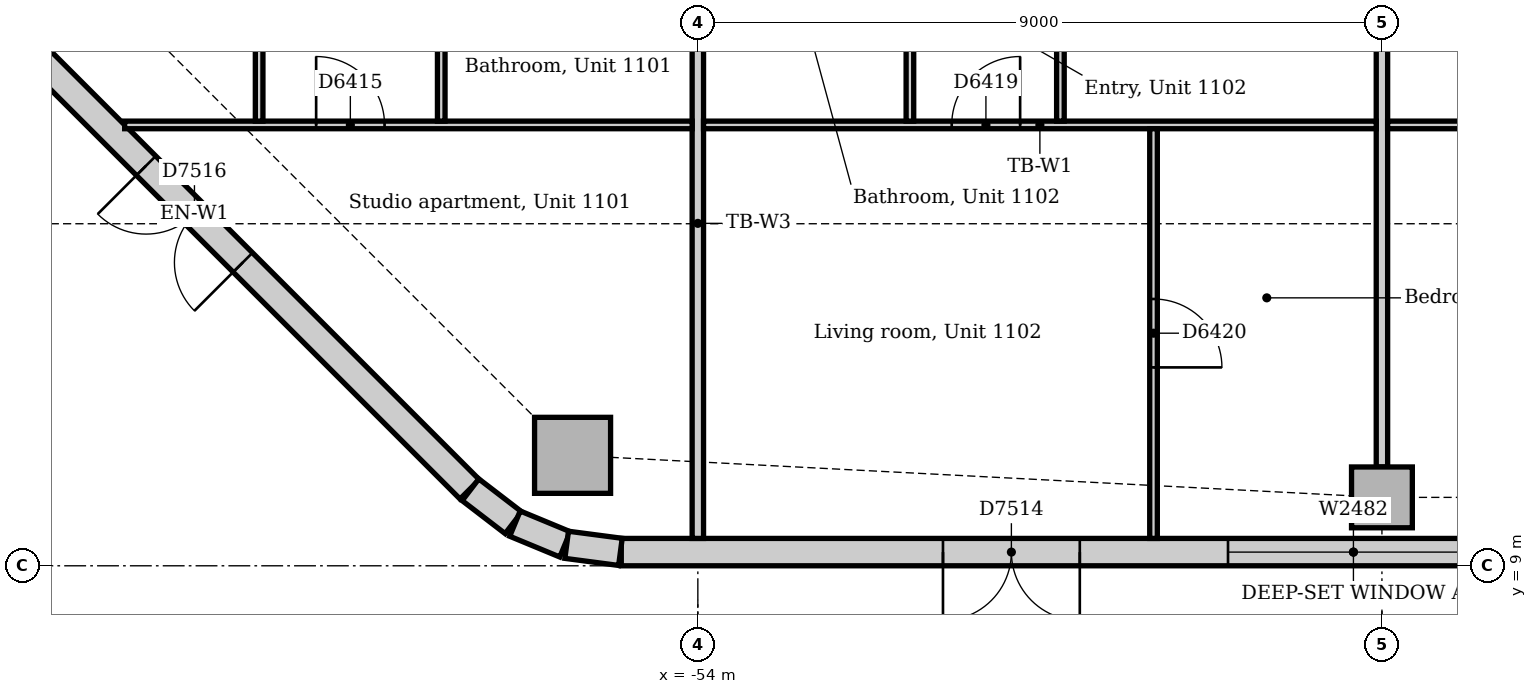
"""IFC4 building model, lengths in metres.
Left out: names, types, materials, properties, quantities, classifications, styles, units other than length and angle.
Written with IfcOpenShell. Run it as: python <this file> out.ifc"""

import sys

from ifc_helpers import new_model, si_unit, direction, frame, frame_2d, origin, origin_2d, place, context, subcontext, project, spatial, rectangle, extrude, element, fill, save


model = new_model("IFC4")
c1 = context("Model", 3, precision=1e-05, world=origin(), true_north=direction((0.0, 1.0)))
c2 = subcontext(c1, "Body", "Model", "MODEL_VIEW")
j1 = project(units=[si_unit("LENGTHUNIT", "METRE"), si_unit("PLANEANGLEUNIT", "RADIAN")], contexts=[c1])
p1 = place(None, origin())
s1 = spatial("IfcSite", under=j1, at=p1, CompositionType="ELEMENT")
p2 = place(p1, origin())
s2 = spatial("IfcBuilding", under=s1, at=p2, CompositionType="ELEMENT")
p3 = place(p2, frame((0.0, 0.0, 51.0)))
s3 = spatial("IfcBuildingStorey", under=s2, at=p3, CompositionType="ELEMENT", Elevation=51.0)
p4 = place(p3, frame((-55.648, 10.453, -0.15), z_axis=(0.0, 0.0, 1.0), x_axis=(1.0, 0.0, 0.0)))
e1 = element("IfcColumn", 1, at=p4, inside=s3, PredefinedType="COLUMN", context=c2, shape_type="SweptSolid", body=[
    extrude(rectangle(XDim=1.0, YDim=1.0, at=origin_2d()), origin(), (0.0, 0.0, 1.0), 4.0),
])
p5 = place(p3, frame((-45.0, 9.9, -0.15), z_axis=(0.0, 0.0, 1.0), x_axis=(1.0, 0.0, 0.0)))
e2 = element("IfcColumn", 2, at=p5, inside=s3, PredefinedType="COLUMN", context=c2, shape_type="SweptSolid", body=[
    extrude(rectangle(XDim=0.8, YDim=0.8, at=origin_2d()), origin(), (0.0, 0.0, 1.0), 4.0),
])
p6 = place(p3, frame((-55.007, 9.18, 0.0), z_axis=(0.0, 0.0, 1.0), x_axis=(1.0, 0.0, 0.0)))
e3 = element("IfcWall", 3, at=p6, inside=s3, PredefinedType="STANDARD", context=c2, shape_type="SweptSolid", body=[
    extrude(rectangle(XDim=23.765, YDim=0.36, at=frame_2d((11.882, 0.0))), origin(), (0.0, 0.0, 1.0), 3.85),
])
p7 = place(p6, frame((4.232, 0.0, 0.0)))
e4 = element("IfcOpeningElement", 4, at=p7, cuts=e3, PredefinedType="OPENING", context=c2, shape_type="SweptSolid", body=[
    extrude(rectangle(XDim=1.8, YDim=2.4, at=frame_2d((0.9, 1.2))), frame((0.0, 0.19, 0.0), z_axis=(0.0, -1.0, 0.0), x_axis=(1.0, 0.0, 0.0)), (0.0, 0.0, 1.0), 0.38),
])
p8 = place(p6, frame((7.982, 0.0, 0.9)))
e5 = element("IfcOpeningElement", 5, at=p8, cuts=e3, PredefinedType="OPENING", context=c2, shape_type="SweptSolid", body=[
    extrude(rectangle(XDim=3.3, YDim=1.6, at=frame_2d((1.65, 0.8))), frame((0.0, 0.19, 0.0), z_axis=(0.0, -1.0, 0.0), x_axis=(1.0, 0.0, 0.0)), (0.0, 0.0, 1.0), 0.38),
])
p9 = place(p6, frame((12.482, 0.0, 0.9)))
e6 = element("IfcOpeningElement", 6, at=p9, cuts=e3, PredefinedType="OPENING", context=c2, shape_type="SweptSolid", body=[
    extrude(rectangle(XDim=3.3, YDim=1.6, at=frame_2d((1.65, 0.8))), frame((0.0, 0.19, 0.0), z_axis=(0.0, -1.0, 0.0), x_axis=(1.0, 0.0, 0.0)), (0.0, 0.0, 1.0), 0.38),
])
p10 = place(p6, frame((16.982, 0.0, 0.9)))
e7 = element("IfcOpeningElement", 7, at=p10, cuts=e3, PredefinedType="OPENING", context=c2, shape_type="SweptSolid", body=[
    extrude(rectangle(XDim=3.3, YDim=1.6, at=frame_2d((1.65, 0.8))), frame((0.0, 0.19, 0.0), z_axis=(0.0, -1.0, 0.0), x_axis=(1.0, 0.0, 0.0)), (0.0, 0.0, 1.0), 0.38),
])
p11 = place(p6, frame((21.424, 0.0, 0.9)))
e8 = element("IfcOpeningElement", 8, at=p11, cuts=e3, PredefinedType="OPENING", context=c2, shape_type="SweptSolid", body=[
    extrude(rectangle(XDim=1.8, YDim=1.6, at=frame_2d((0.9, 0.8))), frame((0.0, 0.19, 0.0), z_axis=(0.0, -1.0, 0.0), x_axis=(1.0, 0.0, 0.0)), (0.0, 0.0, 1.0), 0.38),
])
p12 = place(p3, frame((-64.244, 17.249, 0.0), z_axis=(0.0, 0.0, 1.0), x_axis=(0.707106781187, -0.707106781187, 0.0)))
e9 = element("IfcWall", 9, at=p12, inside=s3, PredefinedType="STANDARD", context=c2, shape_type="SweptSolid", body=[
    extrude(rectangle(XDim=10.243, YDim=0.36, at=frame_2d((5.121, 0.0))), origin(), (0.0, 0.0, 1.0), 3.85),
])
p13 = place(p12, frame((4.221, 0.0, 0.0)))
e10 = element("IfcOpeningElement", 10, at=p13, cuts=e9, PredefinedType="OPENING", context=c2, shape_type="SweptSolid", body=[
    extrude(rectangle(XDim=1.8, YDim=2.4, at=frame_2d((0.9, 1.2))), frame((0.0, 0.19, 0.0), z_axis=(0.0, -1.0, 0.0), x_axis=(1.0, 0.0, 0.0)), (0.0, 0.0, 1.0), 0.38),
])
p14 = place(p3, frame((-56.991, 10.0, 0.0), z_axis=(0.0, 0.0, 1.0), x_axis=(0.793321924995, -0.608802368033, 0.0)))
e11 = element("IfcWall", 11, at=p14, inside=s3, PredefinedType="STANDARD", context=c2, shape_type="SweptSolid", body=[
    extrude(rectangle(XDim=0.713, YDim=0.36, at=frame_2d((0.357, 0.0))), origin(), (0.0, 0.0, 1.0), 3.85),
])
for number, where, z_axis, x_axis in (
    (12, (-56.406, 9.555, 0.0), (0.0, 0.0, 1.0), (0.924, -0.383, 0.0)),
    (13, (-55.726, 9.276, 0.0), (0.0, 0.0, 1.0), (0.991, -0.131, 0.0)),
):
    element("IfcWall", number, at=place(p3, frame(where, z_axis=z_axis, x_axis=x_axis)), inside=s3, PredefinedType="STANDARD", context=c2, shape_type="SweptSolid", body=[
        extrude(rectangle(XDim=0.713, YDim=0.36, at=frame_2d((0.356, 0.0))), origin(), (0.0, 0.0, 1.0), 3.85),
    ])
p15 = place(p3, frame((-54.0, 9.36, 0.0), z_axis=(0.0, 0.0, 1.0), x_axis=(0.0, 1.0, 0.0)))
e14 = element("IfcWall", 14, at=p15, inside=s3, PredefinedType="PARTITIONING", context=c2, shape_type="SweptSolid", body=[
    extrude(rectangle(XDim=8.29, YDim=0.15, at=frame_2d((4.145, 0.0))), origin(), (0.0, 0.0, 1.0), 3.256),
])
p16 = place(p3, frame((-45.0, 10.3, 0.0), z_axis=(0.0, 0.0, 1.0), x_axis=(0.0, 1.0, 0.0)))
e15 = element("IfcWall", 15, at=p16, inside=s3, PredefinedType="PARTITIONING", context=c2, shape_type="SweptSolid", body=[
    extrude(rectangle(XDim=7.35, YDim=0.15, at=frame_2d((3.675, 0.0))), origin(), (0.0, 0.0, 1.0), 3.256),
])
p17 = place(p3, frame((-44.925, 14.8, 0.0), z_axis=(0.0, 0.0, 1.0), x_axis=(1.0, 0.0, 0.0)))
e16 = element("IfcWall", 16, at=p17, inside=s3, PredefinedType="PARTITIONING", context=c2, shape_type="SweptSolid", body=[
    extrude(rectangle(XDim=8.85, YDim=0.1, at=frame_2d((4.425, 0.0))), origin(), (0.0, 0.0, 1.0), 3.85),
])
p18 = place(p17, frame((3.265, 0.0, 0.0)))
e17 = element("IfcOpeningElement", 17, at=p18, cuts=e16, PredefinedType="OPENING", context=c2, shape_type="SweptSolid", body=[
    extrude(rectangle(XDim=0.9, YDim=2.1, at=frame_2d((0.45, 1.05))), frame((0.0, 0.06, 0.0), z_axis=(0.0, -1.0, 0.0), x_axis=(1.0, 0.0, 0.0)), (0.0, 0.0, 1.0), 0.12),
])
p19 = place(p3, frame((-53.925, 14.8, 0.0), z_axis=(0.0, 0.0, 1.0), x_axis=(1.0, 0.0, 0.0)))
e18 = element("IfcWall", 18, at=p19, inside=s3, PredefinedType="PARTITIONING", context=c2, shape_type="SweptSolid", body=[
    extrude(rectangle(XDim=8.85, YDim=0.1, at=frame_2d((4.425, 0.0))), origin(), (0.0, 0.0, 1.0), 3.85),
])
p20 = place(p19, frame((3.265, 0.0, 0.0)))
e19 = element("IfcOpeningElement", 19, at=p20, cuts=e18, PredefinedType="OPENING", context=c2, shape_type="SweptSolid", body=[
    extrude(rectangle(XDim=0.9, YDim=2.1, at=frame_2d((0.45, 1.05))), frame((0.0, 0.06, 0.0), z_axis=(0.0, -1.0, 0.0), x_axis=(1.0, 0.0, 0.0)), (0.0, 0.0, 1.0), 0.12),
])
p21 = place(p3, frame((-61.541, 14.8, 0.0), z_axis=(0.0, 0.0, 1.0), x_axis=(1.0, 0.0, 0.0)))
e20 = element("IfcWall", 20, at=p21, inside=s3, PredefinedType="PARTITIONING", context=c2, shape_type="SweptSolid", body=[
    extrude(rectangle(XDim=7.466, YDim=0.1, at=frame_2d((3.733, 0.0))), origin(), (0.0, 0.0, 1.0), 3.85),
])
p22 = place(p21, frame((2.519, 0.0, 0.0)))
e21 = element("IfcOpeningElement", 21, at=p22, cuts=e20, PredefinedType="OPENING", context=c2, shape_type="SweptSolid", body=[
    extrude(rectangle(XDim=0.9, YDim=2.1, at=frame_2d((0.45, 1.05))), frame((0.0, 0.06, 0.0), z_axis=(0.0, -1.0, 0.0), x_axis=(1.0, 0.0, 0.0)), (0.0, 0.0, 1.0), 0.12),
])
p23 = place(p3, frame((-48.005, 9.36, 0.0), z_axis=(0.0, 0.0, 1.0), x_axis=(0.0, 1.0, 0.0)))
e22 = element("IfcWall", 22, at=p23, inside=s3, PredefinedType="PARTITIONING", context=c2, shape_type="SweptSolid", body=[
    extrude(rectangle(XDim=5.39, YDim=0.1, at=frame_2d((2.695, 0.0))), origin(), (0.0, 0.0, 1.0), 3.85),
])
p24 = place(p23, frame((2.25, 0.0, 0.0)))
e23 = element("IfcOpeningElement", 23, at=p24, cuts=e22, PredefinedType="OPENING", context=c2, shape_type="SweptSolid", body=[
    extrude(rectangle(XDim=0.9, YDim=2.1, at=frame_2d((0.45, 1.05))), frame((0.0, 0.06, 0.0), z_axis=(0.0, -1.0, 0.0), x_axis=(1.0, 0.0, 0.0)), (0.0, 0.0, 1.0), 0.12),
])
p25 = place(p3, frame((-59.772, 14.85, 0.0), z_axis=(0.0, 0.0, 1.0), x_axis=(0.0, 1.0, 0.0)))
e24 = element("IfcWall", 24, at=p25, inside=s3, PredefinedType="PARTITIONING", context=c2, shape_type="SweptSolid", body=[
    extrude(rectangle(XDim=3.075, YDim=0.1, at=frame_2d((1.538, 0.0))), origin(), (0.0, 0.0, 1.0), 3.85),
])
p26 = place(p25, frame((1.1, 0.0, 0.0)))
e25 = element("IfcOpeningElement", 25, at=p26, cuts=e24, PredefinedType="OPENING", context=c2, shape_type="SweptSolid", body=[
    extrude(rectangle(XDim=0.9, YDim=2.1, at=frame_2d((0.45, 1.05))), frame((0.0, 0.06, 0.0), z_axis=(0.0, -1.0, 0.0), x_axis=(1.0, 0.0, 0.0)), (0.0, 0.0, 1.0), 0.12),
])
p27 = place(p3, frame((-57.376, 14.85, 0.0), z_axis=(0.0, 0.0, 1.0), x_axis=(0.0, 1.0, 0.0)))
e26 = element("IfcWall", 26, at=p27, inside=s3, PredefinedType="PARTITIONING", context=c2, shape_type="SweptSolid", body=[
    extrude(rectangle(XDim=3.075, YDim=0.1, at=frame_2d((1.538, 0.0))), origin(), (0.0, 0.0, 1.0), 3.85),
])
p28 = place(p27, frame((1.1, 0.0, 0.0)))
e27 = element("IfcOpeningElement", 27, at=p28, cuts=e26, PredefinedType="OPENING", context=c2, shape_type="SweptSolid", body=[
    extrude(rectangle(XDim=0.9, YDim=2.1, at=frame_2d((0.45, 1.05))), frame((0.0, 0.06, 0.0), z_axis=(0.0, -1.0, 0.0), x_axis=(1.0, 0.0, 0.0)), (0.0, 0.0, 1.0), 0.12),
])
p29 = place(p3, frame((-51.21, 14.85, 0.0), z_axis=(0.0, 0.0, 1.0), x_axis=(0.0, 1.0, 0.0)))
e28 = element("IfcWall", 28, at=p29, inside=s3, PredefinedType="PARTITIONING", context=c2, shape_type="SweptSolid", body=[
    extrude(rectangle(XDim=3.075, YDim=0.1, at=frame_2d((1.538, 0.0))), origin(), (0.0, 0.0, 1.0), 3.85),
])
p30 = place(p29, frame((1.1, 0.0, 0.0)))
e29 = element("IfcOpeningElement", 29, at=p30, cuts=e28, PredefinedType="OPENING", context=c2, shape_type="SweptSolid", body=[
    extrude(rectangle(XDim=0.9, YDim=2.1, at=frame_2d((0.45, 1.05))), frame((0.0, 0.06, 0.0), z_axis=(0.0, -1.0, 0.0), x_axis=(1.0, 0.0, 0.0)), (0.0, 0.0, 1.0), 0.12),
])
p31 = place(p3, frame((-49.23, 14.85, 0.0), z_axis=(0.0, 0.0, 1.0), x_axis=(0.0, 1.0, 0.0)))
e30 = element("IfcWall", 30, at=p31, inside=s3, PredefinedType="PARTITIONING", context=c2, shape_type="SweptSolid", body=[
    extrude(rectangle(XDim=3.075, YDim=0.1, at=frame_2d((1.538, 0.0))), origin(), (0.0, 0.0, 1.0), 3.85),
])
p32 = place(p31, frame((1.1, 0.0, 0.0)))
e31 = element("IfcOpeningElement", 31, at=p32, cuts=e30, PredefinedType="OPENING", context=c2, shape_type="SweptSolid", body=[
    extrude(rectangle(XDim=0.9, YDim=2.1, at=frame_2d((0.45, 1.05))), frame((0.0, 0.06, 0.0), z_axis=(0.0, -1.0, 0.0), x_axis=(1.0, 0.0, 0.0)), (0.0, 0.0, 1.0), 0.12),
])
p33 = place(p7, frame((1.8, 0.0, 0.0), z_axis=(0.0, 0.0, 1.0), x_axis=(-1.0, 0.0, 0.0)))
e32 = element("IfcDoor", 32, at=p33, inside=s3, OperationType="DOUBLE_DOOR_SINGLE_SWING", PredefinedType="DOOR", context=c2, shape_type="SweptSolid", body=[
    extrude(rectangle(XDim=1.8, YDim=2.4, at=frame_2d((0.9, 1.2))), frame((0.0, -0.07, 0.0), z_axis=(0.0, -1.0, 0.0), x_axis=(1.0, 0.0, 0.0)), (0.0, 0.0, 1.0), 0.05),
])
fill(e4, e32)
p34 = place(p8, origin())
e33 = element("IfcWindow", 33, at=p34, inside=s3, PartitioningType="SINGLE_PANEL", PredefinedType="WINDOW", context=c2, shape_type="SweptSolid", body=[
    extrude(rectangle(XDim=3.3, YDim=1.6, at=frame_2d((1.65, 0.8))), frame((0.0, 0.13, 0.0), z_axis=(0.0, -1.0, 0.0), x_axis=(1.0, 0.0, 0.0)), (0.0, 0.0, 1.0), 0.06),
])
fill(e5, e33)
p35 = place(p13, frame((1.8, 0.0, 0.0), z_axis=(0.0, 0.0, 1.0), x_axis=(-1.0, 0.0, 0.0)))
e34 = element("IfcDoor", 34, at=p35, inside=s3, OperationType="DOUBLE_DOOR_SINGLE_SWING", PredefinedType="DOOR", context=c2, shape_type="SweptSolid", body=[
    extrude(rectangle(XDim=1.8, YDim=2.4, at=frame_2d((0.9, 1.2))), frame((0.0, -0.07, 0.0), z_axis=(0.0, -1.0, 0.0), x_axis=(1.0, 0.0, 0.0)), (0.0, 0.0, 1.0), 0.05),
])
fill(e10, e34)
p36 = place(p22, origin())
e35 = element("IfcDoor", 35, at=p36, inside=s3, OperationType="SINGLE_SWING_LEFT", PredefinedType="DOOR", context=c2, shape_type="SweptSolid", body=[
    extrude(rectangle(XDim=0.9, YDim=2.1, at=frame_2d((0.45, 1.05))), frame((0.0, 0.025, 0.0), z_axis=(0.0, -1.0, 0.0), x_axis=(1.0, 0.0, 0.0)), (0.0, 0.0, 1.0), 0.05),
])
fill(e21, e35)
p37 = place(p20, origin())
e36 = element("IfcDoor", 36, at=p37, inside=s3, OperationType="SINGLE_SWING_RIGHT", PredefinedType="DOOR", context=c2, shape_type="SweptSolid", body=[
    extrude(rectangle(XDim=0.9, YDim=2.1, at=frame_2d((0.45, 1.05))), frame((0.0, 0.025, 0.0), z_axis=(0.0, -1.0, 0.0), x_axis=(1.0, 0.0, 0.0)), (0.0, 0.0, 1.0), 0.05),
])
fill(e19, e36)
p38 = place(p24, frame((0.9, 0.0, 0.0), z_axis=(0.0, 0.0, 1.0), x_axis=(-1.0, 0.0, 0.0)))
e37 = element("IfcDoor", 37, at=p38, inside=s3, OperationType="SINGLE_SWING_RIGHT", PredefinedType="DOOR", context=c2, shape_type="SweptSolid", body=[
    extrude(rectangle(XDim=0.9, YDim=2.1, at=frame_2d((0.45, 1.05))), frame((0.0, 0.025, 0.0), z_axis=(0.0, -1.0, 0.0), x_axis=(1.0, 0.0, 0.0)), (0.0, 0.0, 1.0), 0.05),
])
fill(e23, e37)
save(model, sys.argv[1])
